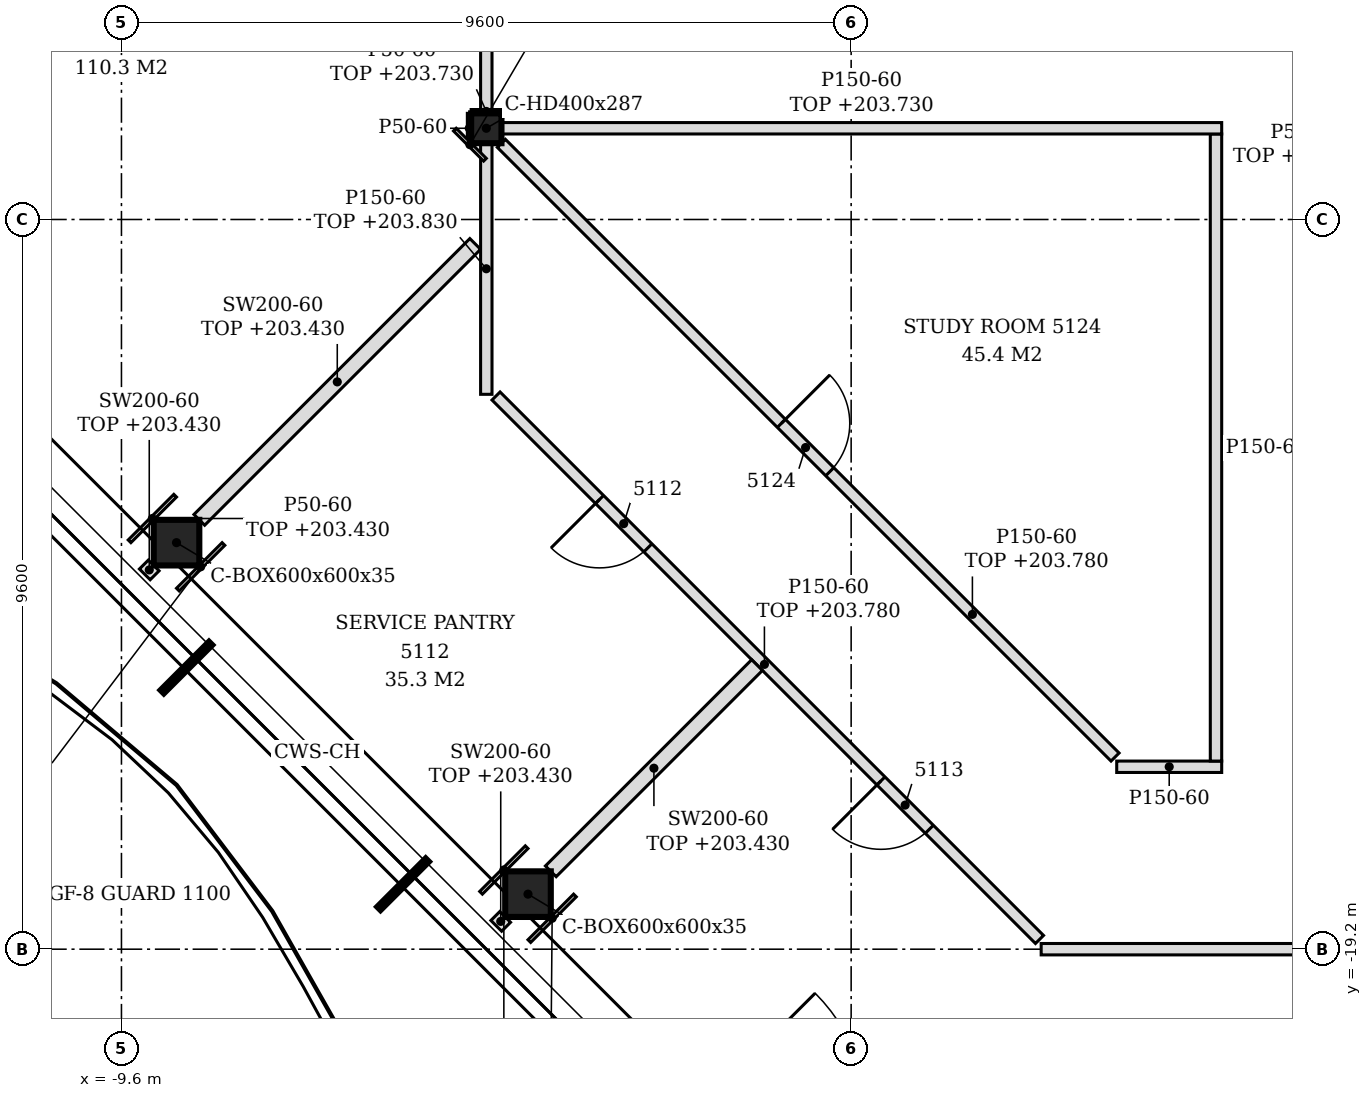
"""IFC4 building model, lengths in metres.
Left out: names, types, materials, properties, quantities, classifications, styles, units other than length and angle.
Written with IfcOpenShell. Run it as: python <this file> out.ifc"""

import sys

from ifc_helpers import new_model, si_unit, direction, frame, frame_2d, origin, origin_2d, place, context, subcontext, project, spatial, polyline, rectangle, hollow_rectangle, i_section, outline, extrude, clip, halfspace, element, fill, save


model = new_model("IFC4")
c1 = context("Model", 3, precision=1e-05, world=origin(), true_north=direction((0.0, 1.0)))
c2 = subcontext(c1, "Body", "Model", "MODEL_VIEW")
j1 = project(units=[si_unit("LENGTHUNIT", "METRE"), si_unit("PLANEANGLEUNIT", "RADIAN")], contexts=[c1])
p1 = place(None, origin())
s1 = spatial("IfcSite", under=j1, at=p1, CompositionType="ELEMENT")
p2 = place(p1, origin())
s2 = spatial("IfcBuilding", under=s1, at=p2, CompositionType="ELEMENT")
p3 = place(p2, frame((0.0, 0.0, 201.0)))
s3 = spatial("IfcBuildingStorey", under=s2, at=p3, CompositionType="ELEMENT", Elevation=201.0)
for number, where, z_axis, x_axis in (
    (1, (-8.876, -13.852, -0.15), (0.0, 0.0, 1.0), (1.0, 0.0, 0.0)),
    (2, (-4.251, -18.476, -0.15), (0.0, 0.0, 1.0), (1.0, 0.0, 0.0)),
):
    element("IfcColumn", number, at=place(p3, frame(where, z_axis=z_axis, x_axis=x_axis)), inside=s3, PredefinedType="COLUMN", context=c2, shape_type="Clipping", body=[
        clip(clip(extrude(hollow_rectangle(XDim=0.6, YDim=0.6, WallThickness=0.035, at=origin_2d()), origin(), (0.0, 0.0, 1.0), 3.5), halfspace(frame((0.0, 0.0, 0.011), z_axis=(0.0, 0.0, 1.0), x_axis=(1.0, 0.0, 0.0)), True)), halfspace(frame((0.0, 0.0, 3.095), z_axis=(0.0, 0.0, 1.0), x_axis=(1.0, 0.0, 0.0)), False)),
    ])
p4 = place(p3, frame((-4.8, -8.4, -0.15), z_axis=(0.0, 0.0, 1.0), x_axis=(1.0, 0.0, 0.0)))
e3 = element("IfcColumn", 3, at=p4, inside=s3, PredefinedType="COLUMN", context=c2, shape_type="SweptSolid", body=[
    extrude(i_section(OverallWidth=0.399, OverallDepth=0.393, WebThickness=0.023, FlangeThickness=0.037, FilletRadius=0.015, at=origin_2d()), origin(), (0.0, 0.0, 1.0), 3.5),
])
p5 = place(p3, frame((2.5, -19.2, 0.0), z_axis=(0.0, 0.0, 1.0), x_axis=(1.0, 0.0, 0.0)))
e4 = element("IfcWall", 4, at=p5, inside=s3, PredefinedType="PARTITIONING", context=c2, shape_type="SweptSolid", body=[
    extrude(outline(polyline([(0.0, 0.0), (24.418, 0.0), (24.418, 2.78), (16.851, 2.78), (16.849, 2.322), (16.549, 2.322), (16.547, 2.78), (4.85, 2.78), (4.848, 2.63), (4.55, 2.63), (4.548, 2.78), (0.0, 2.78), (0.0, 0.0)])), frame((0.0, 0.075, 0.0), z_axis=(0.0, -1.0, 0.0), x_axis=(1.0, 0.0, 0.0)), (0.0, 0.0, 1.0), 0.15),
])
p6 = place(p5, frame((11.45, 0.0, 0.0)))
e5 = element("IfcOpeningElement", 5, at=p6, cuts=e4, PredefinedType="OPENING", context=c2, shape_type="SweptSolid", body=[
    extrude(rectangle(XDim=0.9, YDim=2.1, at=frame_2d((0.45, 1.05))), frame((0.0, 0.085, 0.0), z_axis=(0.0, -1.0, 0.0), x_axis=(1.0, 0.0, 0.0)), (0.0, 0.0, 1.0), 0.17),
])
p7 = place(p5, frame((18.794, 0.0, 0.0)))
e6 = element("IfcOpeningElement", 6, at=p7, cuts=e4, PredefinedType="OPENING", context=c2, shape_type="SweptSolid", body=[
    extrude(rectangle(XDim=0.9, YDim=2.1, at=frame_2d((0.45, 1.05))), frame((0.0, 0.085, 0.0), z_axis=(0.0, -1.0, 0.0), x_axis=(1.0, 0.0, 0.0)), (0.0, 0.0, 1.0), 0.17),
])
p8 = place(p3, frame((2.478, -19.072, 0.0), z_axis=(0.0, 0.0, 1.0), x_axis=(-0.707106781187, 0.707106781187, 0.0)))
e7 = element("IfcWall", 7, at=p8, inside=s3, PredefinedType="PARTITIONING", context=c2, shape_type="SweptSolid", body=[
    extrude(rectangle(XDim=10.112, YDim=0.15, at=frame_2d((5.056, 0.0))), origin(), (0.0, 0.0, 1.0), 2.78),
])
p9 = place(p8, frame((7.286, 0.0, 0.0)))
e8 = element("IfcOpeningElement", 8, at=p9, cuts=e7, PredefinedType="OPENING", context=c2, shape_type="SweptSolid", body=[
    extrude(rectangle(XDim=0.9, YDim=2.1, at=frame_2d((0.45, 1.05))), frame((0.0, 0.085, 0.0), z_axis=(0.0, -1.0, 0.0), x_axis=(1.0, 0.0, 0.0)), (0.0, 0.0, 1.0), 0.17),
])
p10 = place(p8, frame((2.05, 0.0, 0.0)))
e9 = element("IfcOpeningElement", 9, at=p10, cuts=e7, PredefinedType="OPENING", context=c2, shape_type="SweptSolid", body=[
    extrude(rectangle(XDim=0.9, YDim=2.1, at=frame_2d((0.45, 1.05))), frame((0.0, 0.085, 0.0), z_axis=(0.0, -1.0, 0.0), x_axis=(1.0, 0.0, 0.0)), (0.0, 0.0, 1.0), 0.17),
])
p11 = place(p3, frame((-4.669, -18.893, 0.0), z_axis=(0.0, 0.0, 1.0), x_axis=(0.707106781187, 0.707106781187, 0.0)))
e10 = element("IfcWall", 10, at=p11, inside=s3, PredefinedType="PARTITIONING", context=c2, shape_type="SweptSolid", body=[
    extrude(rectangle(XDim=0.166, YDim=0.2, at=frame_2d((0.083, 0.0))), origin(), (0.0, 0.0, 1.0), 2.43),
])
p12 = place(p3, frame((-3.952, -18.176, 0.0), z_axis=(0.0, 0.0, 1.0), x_axis=(0.707138590574, 0.707074970368, 0.0)))
e11 = element("IfcWall", 11, at=p12, inside=s3, PredefinedType="PARTITIONING", context=c2, shape_type="SweptSolid", body=[
    extrude(rectangle(XDim=3.837, YDim=0.2, at=frame_2d((1.919, 0.0))), origin(), (0.0, 0.0, 1.0), 2.43),
])
p13 = place(p3, frame((3.494, -16.8, 0.0), z_axis=(0.0, 0.0, 1.0), x_axis=(1.0, 0.0, 0.0)))
e12 = element("IfcWall", 12, at=p13, inside=s3, PredefinedType="PARTITIONING", context=c2, shape_type="SweptSolid", body=[
    extrude(rectangle(XDim=1.381, YDim=0.15, at=frame_2d((0.69, 0.0))), origin(), (0.0, 0.0, 1.0), 3.35),
])
p14 = place(p3, frame((3.472, -16.672, 0.0), z_axis=(0.0, 0.0, 1.0), x_axis=(-0.70709609053, 0.707117471682, 0.0)))
e13 = element("IfcWall", 13, at=p14, inside=s3, PredefinedType="PARTITIONING", context=c2, shape_type="SweptSolid", body=[
    extrude(rectangle(XDim=11.418, YDim=0.15, at=frame_2d((5.709, 0.0))), origin(), (0.0, 0.0, 1.0), 2.78),
])
p15 = place(p14, frame((5.308, 0.0, 0.0)))
e14 = element("IfcOpeningElement", 14, at=p15, cuts=e13, PredefinedType="OPENING", context=c2, shape_type="SweptSolid", body=[
    extrude(rectangle(XDim=0.9, YDim=2.1, at=frame_2d((0.45, 1.05))), frame((0.0, 0.085, 0.0), z_axis=(0.0, -1.0, 0.0), x_axis=(1.0, 0.0, 0.0)), (0.0, 0.0, 1.0), 0.17),
])
p16 = place(p3, frame((4.8, -16.725, 0.0), z_axis=(0.0, 0.0, 1.0), x_axis=(0.0, 1.0, 0.0)))
e15 = element("IfcWall", 15, at=p16, inside=s3, PredefinedType="PARTITIONING", context=c2, shape_type="SweptSolid", body=[
    extrude(outline(polyline([(0.0, 0.0), (8.25, 0.0), (8.25, 2.73), (8.175, 2.73), (8.173, 3.35), (2.43, 3.35), (2.428, 2.78), (2.22, 2.78), (2.218, 3.35), (0.0, 3.35), (0.0, 0.0)])), frame((0.0, 0.075, 0.0), z_axis=(0.0, -1.0, 0.0), x_axis=(1.0, 0.0, 0.0)), (0.0, 0.0, 1.0), 0.15),
])
p17 = place(p3, frame((-9.293, -14.269, 0.0), z_axis=(0.0, 0.0, 1.0), x_axis=(0.707106781187, 0.707106781187, 0.0)))
e16 = element("IfcWall", 16, at=p17, inside=s3, PredefinedType="PARTITIONING", context=c2, shape_type="SweptSolid", body=[
    extrude(rectangle(XDim=0.166, YDim=0.2, at=frame_2d((0.083, 0.0))), origin(), (0.0, 0.0, 1.0), 2.43),
])
p18 = place(p3, frame((-8.576, -13.552, 0.0), z_axis=(0.0, 0.0, 1.0), x_axis=(0.707106781187, 0.707106781187, 0.0)))
e17 = element("IfcWall", 17, at=p18, inside=s3, PredefinedType="PARTITIONING", context=c2, shape_type="SweptSolid", body=[
    extrude(rectangle(XDim=5.134, YDim=0.2, at=frame_2d((2.567, 0.0))), origin(), (0.0, 0.0, 1.0), 2.43),
])
p19 = place(p3, frame((-4.8, -11.9, 0.0), z_axis=(0.0, 0.0, 1.0), x_axis=(0.0, 1.0, 0.0)))
e18 = element("IfcWall", 18, at=p19, inside=s3, PredefinedType="PARTITIONING", context=c2, shape_type="SweptSolid", body=[
    extrude(rectangle(XDim=3.304, YDim=0.15, at=frame_2d((1.652, 0.0))), origin(), (0.0, 0.0, 1.0), 2.83),
])
p20 = place(p3, frame((-4.601, -8.4, 0.0), z_axis=(0.0, 0.0, 1.0), x_axis=(1.0, 0.0, 0.0)))
e19 = element("IfcWall", 19, at=p20, inside=s3, PredefinedType="PARTITIONING", context=c2, shape_type="SweptSolid", body=[
    extrude(rectangle(XDim=9.476, YDim=0.15, at=frame_2d((4.738, 0.0))), origin(), (0.0, 0.0, 1.0), 2.73),
])
p21 = place(p3, frame((-4.8, -8.204, 0.0), z_axis=(0.0, 0.0, 1.0), x_axis=(0.0, 1.0, 0.0)))
e20 = element("IfcWall", 20, at=p21, inside=s3, PredefinedType="PARTITIONING", context=c2, shape_type="SweptSolid", body=[
    extrude(rectangle(XDim=10.407, YDim=0.15, at=frame_2d((5.204, 0.0))), origin(), (0.0, 0.0, 1.0), 2.73),
])
p22 = place(p21, frame((2.354, 0.0, 0.0)))
e21 = element("IfcOpeningElement", 21, at=p22, cuts=e20, PredefinedType="OPENING", context=c2, shape_type="SweptSolid", body=[
    extrude(rectangle(XDim=0.9, YDim=2.1, at=frame_2d((0.45, 1.05))), frame((0.0, 0.085, 0.0), z_axis=(0.0, -1.0, 0.0), x_axis=(1.0, 0.0, 0.0)), (0.0, 0.0, 1.0), 0.17),
])
p23 = place(p3, frame((-4.869, -18.458, 0.0), z_axis=(0.0, 0.0, 1.0), x_axis=(0.706962899457, 0.707250633645, 0.0)))
e22 = element("IfcWall", 22, at=p23, inside=s3, PredefinedType="PARTITIONING", context=c2, shape_type="SweptSolid", body=[
    extrude(rectangle(XDim=0.848, YDim=0.05, at=frame_2d((0.424, 0.0))), origin(), (0.0, 0.0, 1.0), 2.43),
])
p24 = place(p3, frame((-4.234, -19.094, 0.0), z_axis=(0.0, 0.0, 1.0), x_axis=(0.707106781187, 0.707106781187, 0.0)))
e23 = element("IfcWall", 23, at=p24, inside=s3, PredefinedType="PARTITIONING", context=c2, shape_type="SweptSolid", body=[
    extrude(rectangle(XDim=0.849, YDim=0.05, at=frame_2d((0.424, 0.0))), origin(), (0.0, 0.0, 1.0), 2.43),
])
p25 = place(p3, frame((-4.818, -8.814, 0.0), z_axis=(0.0, 0.0, 1.0), x_axis=(-0.707106781187, 0.707106781187, 0.0)))
e24 = element("IfcWall", 24, at=p25, inside=s3, PredefinedType="PARTITIONING", context=c2, shape_type="SweptSolid", body=[
    extrude(rectangle(XDim=0.56, YDim=0.05, at=frame_2d((0.28, 0.0))), origin(), (0.0, 0.0, 1.0), 2.83),
])
for number, where, z_axis, x_axis in (
    (25, (-9.493, -13.834, 0.0), (0.0, 0.0, 1.0), (0.707, 0.707, 0.0)),
    (26, (-8.858, -14.469, 0.0), (0.0, 0.0, 1.0), (0.707, 0.707, 0.0)),
):
    element("IfcWall", number, at=place(p3, frame(where, z_axis=z_axis, x_axis=x_axis)), inside=s3, PredefinedType="PARTITIONING", context=c2, shape_type="SweptSolid", body=[
        extrude(rectangle(XDim=0.848, YDim=0.05, at=frame_2d((0.424, 0.0))), origin(), (0.0, 0.0, 1.0), 2.43),
    ])
p26 = place(p3, frame((-5.024, -8.596, 0.0), z_axis=(0.0, 0.0, 1.0), x_axis=(0.0, 1.0, 0.0)))
e27 = element("IfcWall", 27, at=p26, inside=s3, PredefinedType="PARTITIONING", context=c2, shape_type="SweptSolid", body=[
    extrude(rectangle(XDim=0.393, YDim=0.05, at=frame_2d((0.196, 0.0))), origin(), (0.0, 0.0, 1.0), 3.35),
])
p27 = place(p3, frame((-5.0, -8.178, 0.0), z_axis=(0.0, 0.0, 1.0), x_axis=(1.0, 0.0, 0.0)))
e28 = element("IfcWall", 28, at=p27, inside=s3, PredefinedType="PARTITIONING", context=c2, shape_type="SweptSolid", body=[
    extrude(rectangle(XDim=0.399, YDim=0.05, at=frame_2d((0.199, 0.0))), origin(), (0.0, 0.0, 1.0), 2.73),
])
p28 = place(p9, origin())
e29 = element("IfcDoor", 29, at=p28, inside=s3, OperationType="SINGLE_SWING_RIGHT", PredefinedType="DOOR", context=c2, shape_type="SweptSolid", body=[
    extrude(rectangle(XDim=0.9, YDim=2.1, at=frame_2d((0.45, 1.05))), frame((0.0, 0.025, 0.0), z_axis=(0.0, -1.0, 0.0), x_axis=(1.0, 0.0, 0.0)), (0.0, 0.0, 1.0), 0.05),
])
fill(e8, e29)
p29 = place(p10, origin())
e30 = element("IfcDoor", 30, at=p29, inside=s3, OperationType="SINGLE_SWING_RIGHT", PredefinedType="DOOR", context=c2, shape_type="SweptSolid", body=[
    extrude(rectangle(XDim=0.9, YDim=2.1, at=frame_2d((0.45, 1.05))), frame((0.0, 0.025, 0.0), z_axis=(0.0, -1.0, 0.0), x_axis=(1.0, 0.0, 0.0)), (0.0, 0.0, 1.0), 0.05),
])
fill(e9, e30)
p30 = place(p15, frame((0.9, 0.0, 0.0), z_axis=(0.0, 0.0, 1.0), x_axis=(-1.0, 0.0, 0.0)))
e31 = element("IfcDoor", 31, at=p30, inside=s3, OperationType="SINGLE_SWING_LEFT", PredefinedType="DOOR", context=c2, shape_type="SweptSolid", body=[
    extrude(rectangle(XDim=0.9, YDim=2.1, at=frame_2d((0.45, 1.05))), frame((0.0, 0.025, 0.0), z_axis=(0.0, -1.0, 0.0), x_axis=(1.0, 0.0, 0.0)), (0.0, 0.0, 1.0), 0.05),
])
fill(e14, e31)
save(model, sys.argv[1])
